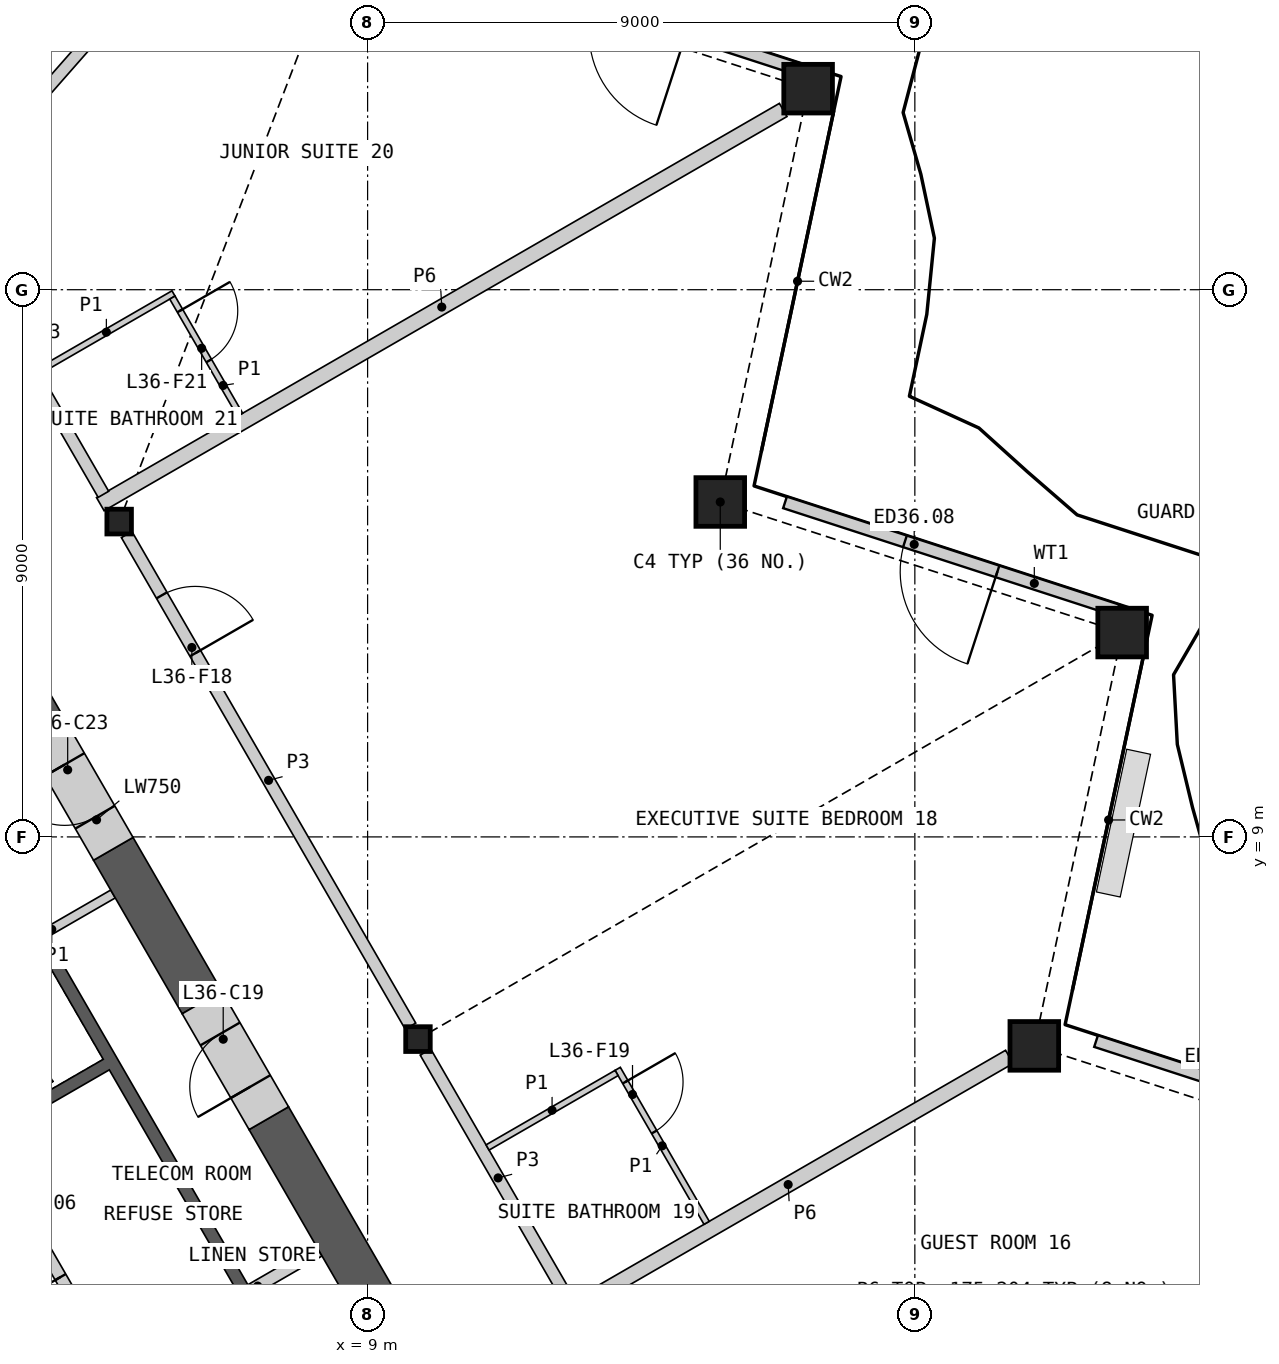
"""IFC4 building model, lengths in metres.
Left out: names, types, materials, properties, quantities, classifications, styles, units other than length and angle.
Written with IfcOpenShell. Run it as: python <this file> out.ifc"""

import sys

from ifc_helpers import new_model, si_unit, direction, frame, frame_2d, origin, origin_2d, place, context, subcontext, project, spatial, polyline, rectangle, hollow_rectangle, i_section, outline, extrude, element, fill, save


model = new_model("IFC4")
c1 = context("Model", 3, precision=1e-05, world=origin(), true_north=direction((0.0, 1.0)))
c2 = subcontext(c1, "Body", "Model", "MODEL_VIEW")
j1 = project(units=[si_unit("LENGTHUNIT", "METRE"), si_unit("PLANEANGLEUNIT", "RADIAN")], contexts=[c1])
p1 = place(None, origin())
s1 = spatial("IfcSite", under=j1, at=p1, CompositionType="ELEMENT")
p2 = place(p1, origin())
s2 = spatial("IfcBuilding", under=s1, at=p2, CompositionType="ELEMENT")
p3 = place(p2, frame((0.0, 0.0, 172.8)))
s3 = spatial("IfcBuildingStorey", under=s2, at=p3, CompositionType="ELEMENT", Elevation=172.8)
for number, where, z_axis, x_axis in (
    (1, (19.965, 5.563, 0.0), (0.0, 0.0, 1.0), (1.0, 0.0, 0.0)),
    (2, (21.409, 12.361, 0.0), (0.0, 0.0, 1.0), (1.0, 0.0, 0.0)),
    (3, (14.8, 14.508, 0.0), (0.0, 0.0, 1.0), (1.0, 0.0, 0.0)),
    (4, (16.245, 21.306, 0.0), (0.0, 0.0, 1.0), (1.0, 0.0, 0.0)),
):
    element("IfcColumn", number, at=place(p3, frame(where, z_axis=z_axis, x_axis=x_axis)), inside=s3, PredefinedType="COLUMN", context=c2, shape_type="SweptSolid", body=[
        extrude(hollow_rectangle(XDim=0.8, YDim=0.8, WallThickness=0.05, at=origin_2d()), origin(), (0.0, 0.0, 1.0), 3.6),
    ])
for number, where, z_axis, x_axis in (
    (5, (9.828, 5.675, 0.0), (0.0, 0.0, 1.0), (1.0, 0.0, 0.0)),
    (6, (4.914, 14.186, 0.0), (0.0, 0.0, 1.0), (1.0, 0.0, 0.0)),
):
    element("IfcColumn", number, at=place(p3, frame(where, z_axis=z_axis, x_axis=x_axis)), inside=s3, PredefinedType="COLUMN", context=c2, shape_type="SweptSolid", body=[
        extrude(i_section(OverallWidth=0.404, OverallDepth=0.407, WebThickness=0.027, FlangeThickness=0.044, at=origin_2d()), origin(), (0.0, 0.0, 1.0), 3.6),
    ])
p4 = place(p3, frame((26.447, 3.865, 0.0), z_axis=(0.0, 0.0, 1.0), x_axis=(-0.951043432761, 0.309057258453, 0.0)))
e7 = element("IfcWall", 7, at=p4, inside=s3, PredefinedType="SOLIDWALL", context=c2, shape_type="SweptSolid", body=[
    extrude(rectangle(XDim=5.748, YDim=0.2, at=frame_2d((2.874, 0.0))), origin(), (0.0, 0.0, 1.0), 2.701),
])
p5 = place(p4, frame((2.074, 0.0, 0.0)))
e8 = element("IfcOpeningElement", 8, at=p5, cuts=e7, PredefinedType="OPENING", context=c2, shape_type="SweptSolid", body=[
    extrude(rectangle(XDim=1.6, YDim=2.4, at=frame_2d((0.8, 1.2))), frame((0.0, 0.11, 0.0), z_axis=(0.0, -1.0, 0.0), x_axis=(1.0, 0.0, 0.0)), (0.0, 0.0, 1.0), 0.22),
])
p6 = place(p3, frame((21.331, 12.726, 0.0), z_axis=(0.0, 0.0, 1.0), x_axis=(-0.95105997304, 0.309006355405, 0.0)))
e9 = element("IfcWall", 9, at=p6, inside=s3, PredefinedType="SOLIDWALL", context=c2, shape_type="SweptSolid", body=[
    extrude(rectangle(XDim=5.748, YDim=0.2, at=frame_2d((2.874, 0.0))), origin(), (0.0, 0.0, 1.0), 2.701),
])
p7 = place(p6, frame((2.074, 0.0, 0.0)))
e10 = element("IfcOpeningElement", 10, at=p7, cuts=e9, PredefinedType="OPENING", context=c2, shape_type="SweptSolid", body=[
    extrude(rectangle(XDim=1.6, YDim=2.4, at=frame_2d((0.8, 1.2))), frame((0.0, 0.11, 0.0), z_axis=(0.0, -1.0, 0.0), x_axis=(1.0, 0.0, 0.0)), (0.0, 0.0, 1.0), 0.22),
])
p8 = place(p3, frame((16.216, 21.586, 0.0), z_axis=(0.0, 0.0, 1.0), x_axis=(-0.95105997304, 0.309006355405, 0.0)))
e11 = element("IfcWall", 11, at=p8, inside=s3, PredefinedType="SOLIDWALL", context=c2, shape_type="SweptSolid", body=[
    extrude(rectangle(XDim=5.748, YDim=0.2, at=frame_2d((2.874, 0.0))), origin(), (0.0, 0.0, 1.0), 2.701),
])
p9 = place(p8, frame((2.074, 0.0, 0.0)))
e12 = element("IfcOpeningElement", 12, at=p9, cuts=e11, PredefinedType="OPENING", context=c2, shape_type="SweptSolid", body=[
    extrude(rectangle(XDim=1.6, YDim=2.4, at=frame_2d((0.8, 1.2))), frame((0.0, 0.11, 0.0), z_axis=(0.0, -1.0, 0.0), x_axis=(1.0, 0.0, 0.0)), (0.0, 0.0, 1.0), 0.22),
])
p10 = place(p3, origin())
e13 = element("IfcWall", 13, at=p10, inside=s3, PredefinedType="SHEAR", context=c2, shape_type="SweptSolid", body=[
    extrude(outline(polyline([(1.561, 6.097), (3.731, 7.35), (7.131, 1.461), (4.96, 0.208), (4.861, 0.381), (6.852, 1.531), (4.752, 5.169), (2.76, 4.019), (2.66, 4.192), (4.652, 5.342), (3.652, 7.074), (1.66, 5.924), (1.561, 6.097)])), origin(), (0.0, 0.0, 1.0), 3.25),
])
p11 = place(p3, frame((5.817, -1.476, 0.0), z_axis=(0.0, 0.0, 1.0), x_axis=(-0.500002616675, 0.866023893041, 0.0)))
e14 = element("IfcWall", 14, at=p11, inside=s3, PredefinedType="SOLIDWALL", context=c2, shape_type="SweptSolid", body=[
    extrude(rectangle(XDim=8.373, YDim=0.2, at=frame_2d((4.187, 0.0))), origin(), (0.0, 0.0, 1.0), 3.25),
])
p12 = place(p11, frame((0.437, 0.0, 0.0)))
e15 = element("IfcOpeningElement", 15, at=p12, cuts=e14, PredefinedType="OPENING", context=c2, shape_type="SweptSolid", body=[
    extrude(rectangle(XDim=0.9, YDim=2.1, at=frame_2d((0.45, 1.05))), frame((0.0, 0.11, 0.0), z_axis=(0.0, -1.0, 0.0), x_axis=(1.0, 0.0, 0.0)), (0.0, 0.0, 1.0), 0.22),
])
p13 = place(p11, frame((3.737, 0.0, 0.0)))
e16 = element("IfcOpeningElement", 16, at=p13, cuts=e14, PredefinedType="OPENING", context=c2, shape_type="SweptSolid", body=[
    extrude(rectangle(XDim=0.9, YDim=2.1, at=frame_2d((0.45, 1.05))), frame((0.0, 0.11, 0.0), z_axis=(0.0, -1.0, 0.0), x_axis=(1.0, 0.0, 0.0)), (0.0, 0.0, 1.0), 0.22),
])
p14 = place(p11, frame((6.937, 0.0, 0.0)))
e17 = element("IfcOpeningElement", 17, at=p14, cuts=e14, PredefinedType="OPENING", context=c2, shape_type="SweptSolid", body=[
    extrude(rectangle(XDim=1.1, YDim=2.1, at=frame_2d((0.55, 1.05))), frame((0.0, 0.11, 0.0), z_axis=(0.0, -1.0, 0.0), x_axis=(1.0, 0.0, 0.0)), (0.0, 0.0, 1.0), 0.22),
])
p15 = place(p3, frame((7.081, 1.548, 0.0), z_axis=(0.0, 0.0, 1.0), x_axis=(0.866003189247, 0.500038474733, 0.0)))
e18 = element("IfcWall", 18, at=p15, inside=s3, PredefinedType="SHEAR", context=c2, shape_type="SweptSolid", body=[
    extrude(rectangle(XDim=1.293, YDim=0.2, at=frame_2d((0.646, 0.0))), origin(), (0.0, 0.0, 1.0), 3.25),
])
p16 = place(p3, frame((3.693, 7.415, 0.0), z_axis=(0.0, 0.0, 1.0), x_axis=(0.866003189247, 0.500038474733, 0.0)))
e19 = element("IfcWall", 19, at=p16, inside=s3, PredefinedType="PARTITIONING", context=c2, shape_type="SweptSolid", body=[
    extrude(rectangle(XDim=1.293, YDim=0.15, at=frame_2d((0.646, 0.0))), origin(), (0.0, 0.0, 1.0), 3.25),
])
p17 = place(p3, frame((14.526, -8.011, 0.0), z_axis=(0.0, 0.0, 1.0), x_axis=(-0.499994855372, 0.866028374016, 0.0)))
e20 = element("IfcWall", 20, at=p17, inside=s3, PredefinedType="SHEAR", context=c2, shape_type="SweptSolid", body=[
    extrude(rectangle(XDim=14.301, YDim=0.75, at=frame_2d((7.15, 0.0))), origin(), (0.0, 0.0, 1.0), 3.25),
])
p18 = place(p3, frame((6.275, 6.279, 0.0), z_axis=(0.0, 0.0, 1.0), x_axis=(-0.500029273391, 0.866008502124, 0.0)))
e21 = element("IfcWall", 21, at=p18, inside=s3, PredefinedType="SHEAR", context=c2, shape_type="SweptSolid", body=[
    extrude(rectangle(XDim=2.916, YDim=0.75, at=frame_2d((1.458, 0.0))), origin(), (0.0, 0.0, 1.0), 3.25),
])
p19 = place(p3, frame((3.717, 10.709, 0.0), z_axis=(0.0, 0.0, 1.0), x_axis=(-0.500005599468, 0.866022170906, 0.0)))
e22 = element("IfcWall", 22, at=p19, inside=s3, PredefinedType="SHEAR", context=c2, shape_type="SweptSolid", body=[
    extrude(rectangle(XDim=2.662, YDim=0.75, at=frame_2d((1.331, 0.0))), origin(), (0.0, 0.0, 1.0), 3.25),
])
p20 = place(p3, frame((7.375, 4.374, 0.0), z_axis=(0.0, 0.0, 1.0), x_axis=(-0.499946605688, 0.86605622881, 0.0)))
e23 = element("IfcWall", 23, at=p20, inside=s3, PredefinedType="SHEAR", context=c2, shape_type="SweptSolid", body=[
    extrude(rectangle(XDim=2.2, YDim=0.75, at=frame_2d((1.1, 0.0))), origin(), (0.0, 0.0, 1.0), 3.25),
])
p21 = place(p20, frame((0.6, 0.0, 0.0)))
e24 = element("IfcOpeningElement", 24, at=p21, cuts=e23, PredefinedType="OPENING", context=c2, shape_type="SweptSolid", body=[
    extrude(rectangle(XDim=1.0, YDim=2.1, at=frame_2d((0.5, 1.05))), frame((0.0, 0.385, 0.0), z_axis=(0.0, -1.0, 0.0), x_axis=(1.0, 0.0, 0.0)), (0.0, 0.0, 1.0), 0.77),
])
p22 = place(p3, frame((4.817, 8.804, 0.0), z_axis=(0.0, 0.0, 1.0), x_axis=(-0.50002983664, 0.866008176907, 0.0)))
e25 = element("IfcWall", 25, at=p22, inside=s3, PredefinedType="SHEAR", context=c2, shape_type="SweptSolid", body=[
    extrude(rectangle(XDim=2.2, YDim=0.75, at=frame_2d((1.1, 0.0))), origin(), (0.0, 0.0, 1.0), 3.25),
])
p23 = place(p22, frame((0.6, 0.0, 0.0)))
e26 = element("IfcOpeningElement", 26, at=p23, cuts=e25, PredefinedType="OPENING", context=c2, shape_type="SweptSolid", body=[
    extrude(rectangle(XDim=1.0, YDim=2.1, at=frame_2d((0.5, 1.05))), frame((0.0, 0.385, 0.0), z_axis=(0.0, -1.0, 0.0), x_axis=(1.0, 0.0, 0.0)), (0.0, 0.0, 1.0), 0.77),
])
p24 = place(p3, frame((14.836, -3.249, 0.0), z_axis=(0.0, 0.0, 1.0), x_axis=(0.866022412254, 0.500005181446, 0.0)))
e27 = element("IfcWall", 27, at=p24, inside=s3, PredefinedType="PARTITIONING", context=c2, shape_type="SweptSolid", body=[
    extrude(rectangle(XDim=13.081, YDim=0.25, at=frame_2d((6.541, 0.0))), origin(), (0.0, 0.0, 1.0), 2.404),
])
p25 = place(p3, frame((4.604, 14.473, 0.0), z_axis=(0.0, 0.0, 1.0), x_axis=(0.866029765546, 0.499992445131, 0.0)))
e28 = element("IfcWall", 28, at=p25, inside=s3, PredefinedType="PARTITIONING", context=c2, shape_type="SweptSolid", body=[
    extrude(rectangle(XDim=12.968, YDim=0.25, at=frame_2d((6.484, 0.0))), origin(), (0.0, 0.0, 1.0), 2.404),
])
p26 = place(p3, frame((5.038, 13.972, 0.0), z_axis=(0.0, 0.0, 1.0), x_axis=(0.50000393355, -0.866023132736, 0.0)))
e29 = element("IfcWall", 29, at=p26, inside=s3, PredefinedType="PARTITIONING", context=c2, shape_type="SweptSolid", body=[
    extrude(rectangle(XDim=9.335, YDim=0.2, at=frame_2d((4.667, 0.0))), origin(), (0.0, 0.0, 1.0), 3.25),
])
p27 = place(p26, frame((1.154, 0.0, 0.0)))
e30 = element("IfcOpeningElement", 30, at=p27, cuts=e29, PredefinedType="OPENING", context=c2, shape_type="SweptSolid", body=[
    extrude(rectangle(XDim=1.1, YDim=2.1, at=frame_2d((0.55, 1.05))), frame((0.0, 0.11, 0.0), z_axis=(0.0, -1.0, 0.0), x_axis=(1.0, 0.0, 0.0)), (0.0, 0.0, 1.0), 0.22),
])
p28 = place(p3, frame((12.278, 1.182, 0.0), z_axis=(0.0, 0.0, 1.0), x_axis=(0.866024457297, 0.500001639361, 0.0)))
e31 = element("IfcWall", 31, at=p28, inside=s3, PredefinedType="PARTITIONING", context=c2, shape_type="SweptSolid", body=[
    extrude(rectangle(XDim=8.402, YDim=0.25, at=frame_2d((4.201, 0.0))), origin(), (0.0, 0.0, 1.0), 2.404),
])
p29 = place(p3, frame((1.913, 19.385, 0.0), z_axis=(0.0, 0.0, 1.0), x_axis=(0.499988331988, -0.866032140209, 0.0)))
e32 = element("IfcWall", 32, at=p29, inside=s3, PredefinedType="PARTITIONING", context=c2, shape_type="SweptSolid", body=[
    extrude(rectangle(XDim=5.485, YDim=0.2, at=frame_2d((2.742, 0.0))), origin(), (0.0, 0.0, 1.0), 3.25),
])
p30 = place(p29, frame((0.352, 0.0, 0.0)))
e33 = element("IfcOpeningElement", 33, at=p30, cuts=e32, PredefinedType="OPENING", context=c2, shape_type="SweptSolid", body=[
    extrude(rectangle(XDim=1.1, YDim=2.1, at=frame_2d((0.55, 1.05))), frame((0.0, 0.11, 0.0), z_axis=(0.0, -1.0, 0.0), x_axis=(1.0, 0.0, 0.0)), (0.0, 0.0, 1.0), 0.22),
])
p31 = place(p3, frame((9.952, 5.461, 0.0), z_axis=(0.0, 0.0, 1.0), x_axis=(0.499990736708, -0.866030751883, 0.0)))
e34 = element("IfcWall", 34, at=p31, inside=s3, PredefinedType="PARTITIONING", context=c2, shape_type="SweptSolid", body=[
    extrude(rectangle(XDim=4.779, YDim=0.2, at=frame_2d((2.389, 0.0))), origin(), (0.0, 0.0, 1.0), 3.25),
])
p32 = place(p3, frame((2.029, 19.373, 0.0), z_axis=(0.0, 0.0, 1.0), x_axis=(0.66019067586, 0.751098043871, 0.0)))
e35 = element("IfcWall", 35, at=p32, inside=s3, PredefinedType="PARTITIONING", context=c2, shape_type="SweptSolid", body=[
    extrude(rectangle(XDim=13.938, YDim=0.2, at=frame_2d((6.969, 0.0))), origin(), (0.0, 0.0, 1.0), 2.404),
])
p33 = place(p3, frame((13.113, 5.186, 0.0), z_axis=(0.0, 0.0, 1.0), x_axis=(0.499963291492, -0.866046596414, 0.0)))
e36 = element("IfcWall", 36, at=p33, inside=s3, PredefinedType="PARTITIONING", context=c2, shape_type="SweptSolid", body=[
    extrude(rectangle(XDim=2.925, YDim=0.1, at=frame_2d((1.462, 0.0))), origin(), (0.0, 0.0, 1.0), 2.404),
])
p34 = place(p33, frame((0.25, 0.0, 0.0)))
e37 = element("IfcOpeningElement", 37, at=p34, cuts=e36, PredefinedType="OPENING", context=c2, shape_type="SweptSolid", body=[
    extrude(rectangle(XDim=0.95, YDim=2.1, at=frame_2d((0.475, 1.05))), frame((0.0, 0.06, 0.0), z_axis=(0.0, -1.0, 0.0), x_axis=(1.0, 0.0, 0.0)), (0.0, 0.0, 1.0), 0.12),
])
p35 = place(p3, frame((3.599, 16.664, 0.0), z_axis=(0.0, 0.0, 1.0), x_axis=(0.865989465428, 0.500062241894, 0.0)))
e38 = element("IfcWall", 38, at=p35, inside=s3, PredefinedType="PARTITIONING", context=c2, shape_type="SweptSolid", body=[
    extrude(rectangle(XDim=2.55, YDim=0.1, at=frame_2d((1.275, 0.0))), origin(), (0.0, 0.0, 1.0), 2.404),
])
p36 = place(p3, frame((10.973, 3.892, 0.0), z_axis=(0.0, 0.0, 1.0), x_axis=(0.866014668023, 0.500018594424, 0.0)))
e39 = element("IfcWall", 39, at=p36, inside=s3, PredefinedType="PARTITIONING", context=c2, shape_type="SweptSolid", body=[
    extrude(rectangle(XDim=2.45, YDim=0.1, at=frame_2d((1.225, 0.0))), origin(), (0.0, 0.0, 1.0), 2.404),
])
p37 = place(p3, frame((5.789, 17.87, 0.0), z_axis=(0.0, 0.0, 1.0), x_axis=(0.49999788721, -0.866026623601, 0.0)))
e40 = element("IfcWall", 40, at=p37, inside=s3, PredefinedType="PARTITIONING", context=c2, shape_type="SweptSolid", body=[
    extrude(rectangle(XDim=2.225, YDim=0.1, at=frame_2d((1.113, 0.0))), origin(), (0.0, 0.0, 1.0), 2.404),
])
p38 = place(p37, frame((0.25, 0.0, 0.0)))
e41 = element("IfcOpeningElement", 41, at=p38, cuts=e40, PredefinedType="OPENING", context=c2, shape_type="SweptSolid", body=[
    extrude(rectangle(XDim=0.95, YDim=2.1, at=frame_2d((0.475, 1.05))), frame((0.0, 0.06, 0.0), z_axis=(0.0, -1.0, 0.0), x_axis=(1.0, 0.0, 0.0)), (0.0, 0.0, 1.0), 0.12),
])
p39 = place(p7, origin())
e42 = element("IfcDoor", 42, at=p39, inside=s3, OperationType="DOUBLE_DOOR_SINGLE_SWING", PredefinedType="DOOR", context=c2, shape_type="SweptSolid", body=[
    extrude(rectangle(XDim=1.6, YDim=2.4, at=frame_2d((0.8, 1.2))), frame((0.0, 0.025, 0.0), z_axis=(0.0, -1.0, 0.0), x_axis=(1.0, 0.0, 0.0)), (0.0, 0.0, 1.0), 0.05),
])
fill(e10, e42)
p40 = place(p13, origin())
e43 = element("IfcDoor", 43, at=p40, inside=s3, OperationType="SINGLE_SWING_LEFT", PredefinedType="DOOR", context=c2, shape_type="SweptSolid", body=[
    extrude(rectangle(XDim=0.9, YDim=2.1, at=frame_2d((0.45, 1.05))), frame((0.0, 0.025, 0.0), z_axis=(0.0, -1.0, 0.0), x_axis=(1.0, 0.0, 0.0)), (0.0, 0.0, 1.0), 0.05),
])
fill(e16, e43)
p41 = place(p21, origin())
e44 = element("IfcDoor", 44, at=p41, inside=s3, OperationType="SINGLE_SWING_LEFT", PredefinedType="DOOR", context=c2, shape_type="SweptSolid", body=[
    extrude(rectangle(XDim=1.0, YDim=2.1, at=frame_2d((0.5, 1.05))), frame((0.0, 0.13, 0.0), z_axis=(0.0, -1.0, 0.0), x_axis=(1.0, 0.0, 0.0)), (0.0, 0.0, 1.0), 0.05),
])
fill(e24, e44)
p42 = place(p23, origin())
e45 = element("IfcDoor", 45, at=p42, inside=s3, OperationType="SINGLE_SWING_RIGHT", PredefinedType="DOOR", context=c2, shape_type="SweptSolid", body=[
    extrude(rectangle(XDim=1.0, YDim=2.1, at=frame_2d((0.5, 1.05))), frame((0.0, 0.13, 0.0), z_axis=(0.0, -1.0, 0.0), x_axis=(1.0, 0.0, 0.0)), (0.0, 0.0, 1.0), 0.05),
])
fill(e26, e45)
p43 = place(p27, origin())
e46 = element("IfcDoor", 46, at=p43, inside=s3, OperationType="SINGLE_SWING_RIGHT", PredefinedType="DOOR", context=c2, shape_type="SweptSolid", body=[
    extrude(rectangle(XDim=1.1, YDim=2.1, at=frame_2d((0.55, 1.05))), frame((0.0, 0.025, 0.0), z_axis=(0.0, -1.0, 0.0), x_axis=(1.0, 0.0, 0.0)), (0.0, 0.0, 1.0), 0.05),
])
fill(e30, e46)
p44 = place(p34, origin())
e47 = element("IfcDoor", 47, at=p44, inside=s3, OperationType="SINGLE_SWING_LEFT", PredefinedType="DOOR", context=c2, shape_type="SweptSolid", body=[
    extrude(rectangle(XDim=0.95, YDim=2.1, at=frame_2d((0.475, 1.05))), frame((0.0, 0.025, 0.0), z_axis=(0.0, -1.0, 0.0), x_axis=(1.0, 0.0, 0.0)), (0.0, 0.0, 1.0), 0.05),
])
fill(e37, e47)
p45 = place(p38, origin())
e48 = element("IfcDoor", 48, at=p45, inside=s3, OperationType="SINGLE_SWING_LEFT", PredefinedType="DOOR", context=c2, shape_type="SweptSolid", body=[
    extrude(rectangle(XDim=0.95, YDim=2.1, at=frame_2d((0.475, 1.05))), frame((0.0, 0.025, 0.0), z_axis=(0.0, -1.0, 0.0), x_axis=(1.0, 0.0, 0.0)), (0.0, 0.0, 1.0), 0.05),
])
fill(e41, e48)
save(model, sys.argv[1])
